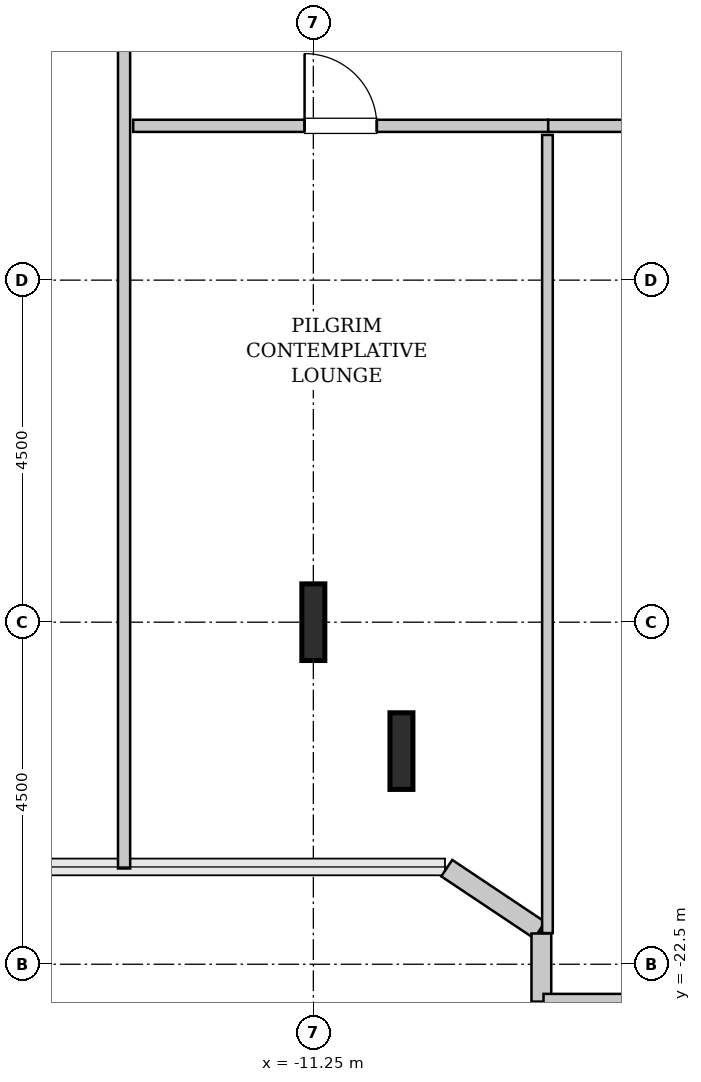
"""IFC4 building model, lengths in metres.
Left out: names, types, materials, properties, quantities, classifications, styles, units other than length and angle.
Written with IfcOpenShell. Run it as: python <this file> out.ifc"""

import sys

from ifc_helpers import new_model, si_unit, direction, frame, frame_2d, origin, origin_2d, place, context, subcontext, project, spatial, rectangle, i_section, extrude, source, transform, mapped, element, fill, save


model = new_model("IFC4")
c1 = context("Model", 3, precision=1e-05, world=origin(), true_north=direction((0.0, 1.0)))
c2 = subcontext(c1, "Body", "Model", "MODEL_VIEW")
j1 = project(units=[si_unit("LENGTHUNIT", "METRE"), si_unit("PLANEANGLEUNIT", "RADIAN")], contexts=[c1])
p1 = place(None, origin())
s1 = spatial("IfcSite", under=j1, at=p1, CompositionType="ELEMENT")
p2 = place(p1, origin())
s2 = spatial("IfcBuilding", under=s1, at=p2, CompositionType="ELEMENT")
p3 = place(p2, frame((0.0, 0.0, 109.8)))
s3 = spatial("IfcBuildingStorey", under=s2, at=p3, CompositionType="ELEMENT", Elevation=109.8)
m1 = source(origin(), c2, "Body", "SweptSolid", [
    extrude(i_section(OverallWidth=0.302, OverallDepth=1.008, WebThickness=0.021, FlangeThickness=0.04, FilletRadius=0.03, at=origin_2d()), origin(), (0.0, 0.0, 1.0), 3.8),
])
for number, where, z_axis, x_axis in (
    (1, (-11.25, -18.0, 0.0), (0.0, 0.0, 1.0), (1.0, 0.0, 0.0)),
    (2, (-10.091, -19.696, 0.0), (0.0, 0.0, 1.0), (1.0, 0.0, 0.0)),
):
    element("IfcColumn", number, at=place(p3, frame(where, z_axis=z_axis, x_axis=x_axis)), inside=s3, PredefinedType="COLUMN", context=c2, shape_type="MappedRepresentation", body=[
        mapped(m1, transform((0.0, 0.0, 0.0), x_axis=(1.0, 0.0, 0.0), y_axis=(0.0, 1.0, 0.0), z_axis=(0.0, 0.0, 1.0), scale=1.0)),
    ])
m2 = source(origin(), c2, "Body", "SweptSolid", [
    extrude(rectangle(XDim=1.469, YDim=0.26, at=frame_2d((0.734, 0.0))), origin(), (0.0, 0.0, 1.0), 3.55),
])
p4 = place(p3, frame((-9.495, -21.236, 0.0), z_axis=(0.0, 0.0, 1.0), x_axis=(0.831461760506, -0.555581983884, 0.0)))
e3 = element("IfcWall", 3, at=p4, inside=s3, PredefinedType="SOLIDWALL", context=c2, shape_type="MappedRepresentation", body=[
    mapped(m2, transform((0.0, 0.0, 0.0), x_axis=(1.0, 0.0, 0.0), y_axis=(0.0, 1.0, 0.0), z_axis=(0.0, 0.0, 1.0), scale=1.0)),
])
m3 = source(origin(), c2, "Body", "SweptSolid", [
    extrude(rectangle(XDim=0.897, YDim=0.26, at=frame_2d((0.448, 0.0))), origin(), (0.0, 0.0, 1.0), 3.55),
])
p5 = place(p3, frame((-8.25, -22.095, 0.0), z_axis=(0.0, 0.0, 1.0), x_axis=(0.0, -1.0, 0.0)))
e4 = element("IfcWall", 4, at=p5, inside=s3, PredefinedType="SOLIDWALL", context=c2, shape_type="MappedRepresentation", body=[
    mapped(m3, transform((0.0, 0.0, 0.0), x_axis=(1.0, 0.0, 0.0), y_axis=(0.0, 1.0, 0.0), z_axis=(0.0, 0.0, 1.0), scale=1.0)),
])
m4 = source(origin(), c2, "Body", "SweptSolid", [
    extrude(rectangle(XDim=1.37, YDim=0.26, at=frame_2d((0.685, 0.0))), origin(), (0.0, 0.0, 1.0), 3.55),
])
p6 = place(p3, frame((-8.222, -23.02, 0.0), z_axis=(0.0, 0.0, 1.0), x_axis=(1.0, 0.0, 0.0)))
e5 = element("IfcWall", 5, at=p6, inside=s3, PredefinedType="SOLIDWALL", context=c2, shape_type="MappedRepresentation", body=[
    mapped(m4, transform((0.0, 0.0, 0.0), x_axis=(1.0, 0.0, 0.0), y_axis=(0.0, 1.0, 0.0), z_axis=(0.0, 0.0, 1.0), scale=1.0)),
])
m5 = source(origin(), c2, "Body", "SweptSolid", [
    extrude(rectangle(XDim=18.445, YDim=0.16, at=frame_2d((9.223, 0.0))), origin(), (0.0, 0.0, 1.0), 3.535),
])
p7 = place(p3, frame((-13.74, -21.24, 0.0), z_axis=(0.0, 0.0, 1.0), x_axis=(0.0, 1.0, 0.0)))
e6 = element("IfcWall", 6, at=p7, inside=s3, PredefinedType="PARTITIONING", context=c2, shape_type="MappedRepresentation", body=[
    mapped(m5, transform((0.0, 0.0, 0.0), x_axis=(1.0, 0.0, 0.0), y_axis=(0.0, 1.0, 0.0), z_axis=(0.0, 0.0, 1.0), scale=1.0)),
])
p8 = place(p7, frame((13.613, 0.0, 0.0)))
e7 = element("IfcOpeningElement", 7, at=p8, cuts=e6, PredefinedType="OPENING", context=c2, shape_type="SweptSolid", body=[
    extrude(rectangle(XDim=0.95, YDim=2.1, at=frame_2d((0.475, 1.05))), frame((0.0, 0.09, 0.0), z_axis=(0.0, -1.0, 0.0), x_axis=(1.0, 0.0, 0.0)), (0.0, 0.0, 1.0), 0.18),
])
m6 = source(origin(), c2, "Body", "SweptSolid", [
    extrude(rectangle(XDim=5.46, YDim=0.16, at=frame_2d((2.73, 0.0))), origin(), (0.0, 0.0, 1.0), 3.535),
])
p9 = place(p3, frame((-13.62, -11.47, 0.0), z_axis=(0.0, 0.0, 1.0), x_axis=(1.0, 0.0, 0.0)))
e8 = element("IfcWall", 8, at=p9, inside=s3, PredefinedType="PARTITIONING", context=c2, shape_type="MappedRepresentation", body=[
    mapped(m6, transform((0.0, 0.0, 0.0), x_axis=(1.0, 0.0, 0.0), y_axis=(0.0, 1.0, 0.0), z_axis=(0.0, 0.0, 1.0), scale=1.0)),
])
p10 = place(p9, frame((2.255, 0.0, 0.0)))
e9 = element("IfcOpeningElement", 9, at=p10, cuts=e8, PredefinedType="OPENING", context=c2, shape_type="SweptSolid", body=[
    extrude(rectangle(XDim=0.95, YDim=2.1, at=frame_2d((0.475, 1.05))), frame((0.0, 0.09, 0.0), z_axis=(0.0, -1.0, 0.0), x_axis=(1.0, 0.0, 0.0)), (0.0, 0.0, 1.0), 0.18),
])
m7 = source(origin(), c2, "Body", "SweptSolid", [
    extrude(rectangle(XDim=10.5, YDim=0.14, at=frame_2d((5.25, 0.0))), origin(), (0.0, 0.0, 1.0), 3.535),
])
p11 = place(p3, frame((-8.17, -22.09, 0.0), z_axis=(0.0, 0.0, 1.0), x_axis=(0.0, 1.0, 0.0)))
e10 = element("IfcWall", 10, at=p11, inside=s3, PredefinedType="PARTITIONING", context=c2, shape_type="MappedRepresentation", body=[
    mapped(m7, transform((0.0, 0.0, 0.0), x_axis=(1.0, 0.0, 0.0), y_axis=(0.0, 1.0, 0.0), z_axis=(0.0, 0.0, 1.0), scale=1.0)),
])
m8 = source(origin(), c2, "Body", "SweptSolid", [
    extrude(rectangle(XDim=5.565, YDim=0.16, at=frame_2d((2.782, 0.0))), origin(), (0.0, 0.0, 1.0), 3.535),
])
p12 = place(p3, frame((-8.16, -11.47, 0.0), z_axis=(0.0, 0.0, 1.0), x_axis=(1.0, 0.0, 0.0)))
e11 = element("IfcWall", 11, at=p12, inside=s3, PredefinedType="PARTITIONING", context=c2, shape_type="MappedRepresentation", body=[
    mapped(m8, transform((0.0, 0.0, 0.0), x_axis=(1.0, 0.0, 0.0), y_axis=(0.0, 1.0, 0.0), z_axis=(0.0, 0.0, 1.0), scale=1.0)),
])
p13 = place(p12, frame((2.308, 0.0, 0.0)))
e12 = element("IfcOpeningElement", 12, at=p13, cuts=e11, PredefinedType="OPENING", context=c2, shape_type="SweptSolid", body=[
    extrude(rectangle(XDim=0.95, YDim=2.1, at=frame_2d((0.475, 1.05))), frame((0.0, 0.09, 0.0), z_axis=(0.0, -1.0, 0.0), x_axis=(1.0, 0.0, 0.0)), (0.0, 0.0, 1.0), 0.18),
])
m9 = source(origin(), c2, "Body", "SweptSolid", [
    extrude(rectangle(XDim=0.95, YDim=2.1, at=frame_2d((0.475, 1.05))), frame((0.0, 0.025, 0.0), z_axis=(0.0, -1.0, 0.0), x_axis=(1.0, 0.0, 0.0)), (0.0, 0.0, 1.0), 0.05),
])
p14 = place(p10, origin())
e13 = element("IfcDoor", 13, at=p14, inside=s3, OperationType="SINGLE_SWING_LEFT", PredefinedType="DOOR", context=c2, shape_type="MappedRepresentation", body=[
    mapped(m9, transform((0.0, 0.0, 0.0), x_axis=(1.0, 0.0, 0.0), y_axis=(0.0, 1.0, 0.0), z_axis=(0.0, 0.0, 1.0), scale=1.0)),
])
fill(e9, e13)
save(model, sys.argv[1])
